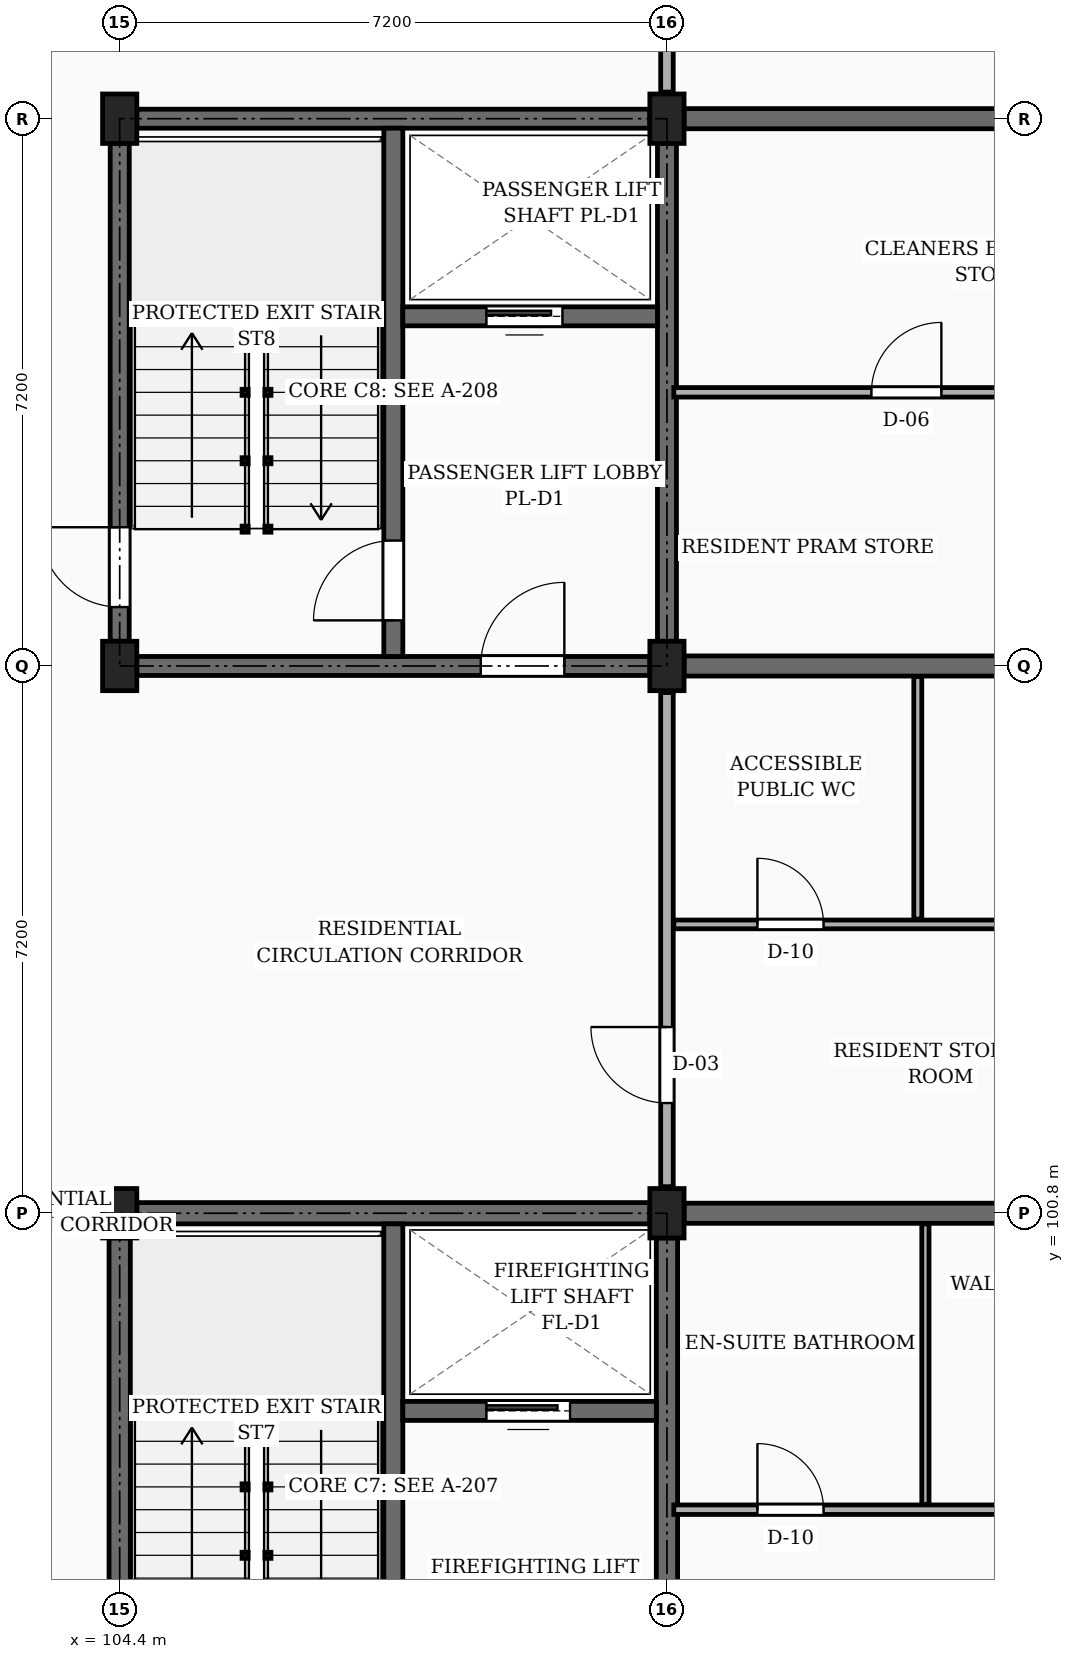
"""IFC4 building model, lengths in metres.
Left out: names, types, materials, properties, quantities, classifications, styles, units other than length and angle.
Written with IfcOpenShell. Run it as: python <this file> out.ifc"""

import sys

from ifc_helpers import new_model, si_unit, direction, frame, frame_2d, origin, origin_2d, place, context, subcontext, project, spatial, rectangle, extrude, element, fill, save


model = new_model("IFC4")
c1 = context("Model", 3, precision=1e-05, world=origin(), true_north=direction((0.0, 1.0)))
c2 = subcontext(c1, "Body", "Model", "MODEL_VIEW")
j1 = project(units=[si_unit("LENGTHUNIT", "METRE"), si_unit("PLANEANGLEUNIT", "RADIAN")], contexts=[c1])
p1 = place(None, origin())
s1 = spatial("IfcSite", under=j1, at=p1, CompositionType="ELEMENT")
p2 = place(p1, origin())
s2 = spatial("IfcBuilding", under=s1, at=p2, CompositionType="ELEMENT")
p3 = place(p2, frame((0.0, 0.0, 10.8)))
s3 = spatial("IfcBuildingStorey", under=s2, at=p3, CompositionType="ELEMENT", Elevation=10.8)
for number, where, z_axis, x_axis in (
    (1, (104.4, 100.8, 0.0), (0.0, 0.0, 1.0), (1.0, 0.0, 0.0)),
    (2, (104.4, 108.0, 0.0), (0.0, 0.0, 1.0), (1.0, 0.0, 0.0)),
    (3, (104.4, 115.2, 0.0), (0.0, 0.0, 1.0), (1.0, 0.0, 0.0)),
    (4, (111.6, 100.8, 0.0), (0.0, 0.0, 1.0), (1.0, 0.0, 0.0)),
    (5, (111.6, 108.0, 0.0), (0.0, 0.0, 1.0), (1.0, 0.0, 0.0)),
    (6, (111.6, 115.2, 0.0), (0.0, 0.0, 1.0), (1.0, 0.0, 0.0)),
):
    element("IfcColumn", number, at=place(p3, frame(where, z_axis=z_axis, x_axis=x_axis)), inside=s3, PredefinedType="COLUMN", context=c2, shape_type="SweptSolid", body=[
        extrude(rectangle(XDim=0.45, YDim=0.65, at=origin_2d()), origin(), (0.0, 0.0, 1.0), 3.15),
    ])
p4 = place(p3, frame((111.825, 100.8, 0.0), z_axis=(0.0, 0.0, 1.0), x_axis=(1.0, 0.0, 0.0)))
e7 = element("IfcWall", 7, at=p4, inside=s3, PredefinedType="SOLIDWALL", context=c2, shape_type="SweptSolid", body=[
    extrude(rectangle(XDim=6.7, YDim=0.265, at=frame_2d((3.35, 0.0))), origin(), (0.0, 0.0, 1.0), 2.19),
])
p5 = place(p3, frame((111.825, 108.0, 0.0), z_axis=(0.0, 0.0, 1.0), x_axis=(1.0, 0.0, 0.0)))
e8 = element("IfcWall", 8, at=p5, inside=s3, PredefinedType="SOLIDWALL", context=c2, shape_type="SweptSolid", body=[
    extrude(rectangle(XDim=6.7, YDim=0.265, at=frame_2d((3.35, 0.0))), origin(), (0.0, 0.0, 1.0), 2.19),
])
p6 = place(p5, frame((4.35, 0.0, 0.0)))
e9 = element("IfcOpeningElement", 9, at=p6, cuts=e8, PredefinedType="OPENING", context=c2, shape_type="SweptSolid", body=[
    extrude(rectangle(XDim=0.98, YDim=2.12, at=frame_2d((0.49, 1.06))), frame((0.0, 0.143, 0.0), z_axis=(0.0, -1.0, 0.0), x_axis=(1.0, 0.0, 0.0)), (0.0, 0.0, 1.0), 0.285),
])
p7 = place(p3, frame((111.825, 115.2, 0.0), z_axis=(0.0, 0.0, 1.0), x_axis=(1.0, 0.0, 0.0)))
e10 = element("IfcWall", 10, at=p7, inside=s3, PredefinedType="SOLIDWALL", context=c2, shape_type="SweptSolid", body=[
    extrude(rectangle(XDim=6.7, YDim=0.265, at=frame_2d((3.35, 0.0))), origin(), (0.0, 0.0, 1.0), 2.19),
])
p8 = place(p3, frame((104.4, 93.925, 0.0), z_axis=(0.0, 0.0, 1.0), x_axis=(0.0, 1.0, 0.0)))
e11 = element("IfcWall", 11, at=p8, inside=s3, PredefinedType="SHEAR", context=c2, shape_type="SweptSolid", body=[
    extrude(rectangle(XDim=6.55, YDim=0.28, at=frame_2d((3.275, 0.0))), origin(), (0.0, 0.0, 1.0), 2.89),
])
p9 = place(p8, frame((0.45, 0.0, 0.0)))
e12 = element("IfcOpeningElement", 12, at=p9, cuts=e11, PredefinedType="OPENING", context=c2, shape_type="SweptSolid", body=[
    extrude(rectangle(XDim=1.05, YDim=2.15, at=frame_2d((0.525, 1.075))), frame((0.0, 0.15, 0.0), z_axis=(0.0, -1.0, 0.0), x_axis=(1.0, 0.0, 0.0)), (0.0, 0.0, 1.0), 0.3),
])
p10 = place(p3, frame((104.625, 100.8, 0.0), z_axis=(0.0, 0.0, 1.0), x_axis=(1.0, 0.0, 0.0)))
e13 = element("IfcWall", 13, at=p10, inside=s3, PredefinedType="SHEAR", context=c2, shape_type="SweptSolid", body=[
    extrude(rectangle(XDim=6.75, YDim=0.28, at=frame_2d((3.375, 0.0))), origin(), (0.0, 0.0, 1.0), 2.89),
])
p11 = place(p3, frame((111.6, 93.925, 0.0), z_axis=(0.0, 0.0, 1.0), x_axis=(0.0, 1.0, 0.0)))
e14 = element("IfcWall", 14, at=p11, inside=s3, PredefinedType="SHEAR", context=c2, shape_type="SweptSolid", body=[
    extrude(rectangle(XDim=6.55, YDim=0.28, at=frame_2d((3.275, 0.0))), origin(), (0.0, 0.0, 1.0), 2.89),
])
p12 = place(p3, frame((108.0, 93.74, 0.0), z_axis=(0.0, 0.0, 1.0), x_axis=(0.0, 1.0, 0.0)))
e15 = element("IfcWall", 15, at=p12, inside=s3, PredefinedType="SHEAR", context=c2, shape_type="SweptSolid", body=[
    extrude(rectangle(XDim=6.92, YDim=0.25, at=frame_2d((3.46, 0.0))), origin(), (0.0, 0.0, 1.0), 2.89),
])
p13 = place(p12, frame((0.46, 0.0, 0.0)))
e16 = element("IfcOpeningElement", 16, at=p13, cuts=e15, PredefinedType="OPENING", context=c2, shape_type="SweptSolid", body=[
    extrude(rectangle(XDim=1.05, YDim=2.15, at=frame_2d((0.525, 1.075))), frame((0.0, 0.135, 0.0), z_axis=(0.0, -1.0, 0.0), x_axis=(1.0, 0.0, 0.0)), (0.0, 0.0, 1.0), 0.27),
])
p14 = place(p3, frame((108.125, 98.2, 0.0), z_axis=(0.0, 0.0, 1.0), x_axis=(1.0, 0.0, 0.0)))
e17 = element("IfcWall", 17, at=p14, inside=s3, PredefinedType="SHEAR", context=c2, shape_type="SweptSolid", body=[
    extrude(rectangle(XDim=3.335, YDim=0.25, at=frame_2d((1.667, 0.0))), origin(), (0.0, 0.0, 1.0), 2.89),
])
p15 = place(p14, frame((1.1, 0.0, 0.0)))
e18 = element("IfcOpeningElement", 18, at=p15, cuts=e17, PredefinedType="OPENING", context=c2, shape_type="SweptSolid", body=[
    extrude(rectangle(XDim=1.1, YDim=2.2, at=frame_2d((0.55, 1.1))), frame((0.0, 0.135, 0.0), z_axis=(0.0, -1.0, 0.0), x_axis=(1.0, 0.0, 0.0)), (0.0, 0.0, 1.0), 0.27),
])
p16 = place(p3, frame((104.4, 108.325, 0.0), z_axis=(0.0, 0.0, 1.0), x_axis=(0.0, 1.0, 0.0)))
e19 = element("IfcWall", 19, at=p16, inside=s3, PredefinedType="SHEAR", context=c2, shape_type="SweptSolid", body=[
    extrude(rectangle(XDim=6.55, YDim=0.25, at=frame_2d((3.275, 0.0))), origin(), (0.0, 0.0, 1.0), 2.89),
])
p17 = place(p16, frame((0.45, 0.0, 0.0)))
e20 = element("IfcOpeningElement", 20, at=p17, cuts=e19, PredefinedType="OPENING", context=c2, shape_type="SweptSolid", body=[
    extrude(rectangle(XDim=1.05, YDim=2.15, at=frame_2d((0.525, 1.075))), frame((0.0, 0.135, 0.0), z_axis=(0.0, -1.0, 0.0), x_axis=(1.0, 0.0, 0.0)), (0.0, 0.0, 1.0), 0.27),
])
p18 = place(p3, frame((104.625, 115.2, 0.0), z_axis=(0.0, 0.0, 1.0), x_axis=(1.0, 0.0, 0.0)))
e21 = element("IfcWall", 21, at=p18, inside=s3, PredefinedType="SHEAR", context=c2, shape_type="SweptSolid", body=[
    extrude(rectangle(XDim=6.75, YDim=0.25, at=frame_2d((3.375, 0.0))), origin(), (0.0, 0.0, 1.0), 2.89),
])
p19 = place(p3, frame((111.6, 108.325, 0.0), z_axis=(0.0, 0.0, 1.0), x_axis=(0.0, 1.0, 0.0)))
e22 = element("IfcWall", 22, at=p19, inside=s3, PredefinedType="SHEAR", context=c2, shape_type="SweptSolid", body=[
    extrude(rectangle(XDim=6.55, YDim=0.25, at=frame_2d((3.275, 0.0))), origin(), (0.0, 0.0, 1.0), 2.89),
])
p20 = place(p3, frame((104.625, 108.0, 0.0), z_axis=(0.0, 0.0, 1.0), x_axis=(1.0, 0.0, 0.0)))
e23 = element("IfcWall", 23, at=p20, inside=s3, PredefinedType="SHEAR", context=c2, shape_type="SweptSolid", body=[
    extrude(rectangle(XDim=6.75, YDim=0.25, at=frame_2d((3.375, 0.0))), origin(), (0.0, 0.0, 1.0), 2.89),
])
p21 = place(p20, frame((4.525, 0.0, 0.0)))
e24 = element("IfcOpeningElement", 24, at=p21, cuts=e23, PredefinedType="OPENING", context=c2, shape_type="SweptSolid", body=[
    extrude(rectangle(XDim=1.1, YDim=2.15, at=frame_2d((0.55, 1.075))), frame((0.0, 0.135, 0.0), z_axis=(0.0, -1.0, 0.0), x_axis=(1.0, 0.0, 0.0)), (0.0, 0.0, 1.0), 0.27),
])
p22 = place(p3, frame((108.0, 108.125, 0.0), z_axis=(0.0, 0.0, 1.0), x_axis=(0.0, 1.0, 0.0)))
e25 = element("IfcWall", 25, at=p22, inside=s3, PredefinedType="SHEAR", context=c2, shape_type="SweptSolid", body=[
    extrude(rectangle(XDim=6.95, YDim=0.25, at=frame_2d((3.475, 0.0))), origin(), (0.0, 0.0, 1.0), 2.89),
])
p23 = place(p22, frame((0.475, 0.0, 0.0)))
e26 = element("IfcOpeningElement", 26, at=p23, cuts=e25, PredefinedType="OPENING", context=c2, shape_type="SweptSolid", body=[
    extrude(rectangle(XDim=1.05, YDim=2.15, at=frame_2d((0.525, 1.075))), frame((0.0, 0.135, 0.0), z_axis=(0.0, -1.0, 0.0), x_axis=(1.0, 0.0, 0.0)), (0.0, 0.0, 1.0), 0.27),
])
p24 = place(p3, frame((108.125, 112.6, 0.0), z_axis=(0.0, 0.0, 1.0), x_axis=(1.0, 0.0, 0.0)))
e27 = element("IfcWall", 27, at=p24, inside=s3, PredefinedType="SHEAR", context=c2, shape_type="SweptSolid", body=[
    extrude(rectangle(XDim=3.35, YDim=0.25, at=frame_2d((1.675, 0.0))), origin(), (0.0, 0.0, 1.0), 2.89),
])
p25 = place(p24, frame((1.1, 0.0, 0.0)))
e28 = element("IfcOpeningElement", 28, at=p25, cuts=e27, PredefinedType="OPENING", context=c2, shape_type="SweptSolid", body=[
    extrude(rectangle(XDim=1.0, YDim=2.2, at=frame_2d((0.5, 1.1))), frame((0.0, 0.135, 0.0), z_axis=(0.0, -1.0, 0.0), x_axis=(1.0, 0.0, 0.0)), (0.0, 0.0, 1.0), 0.27),
])
p26 = place(p3, frame((111.6, 101.15, 0.0), z_axis=(0.0, 0.0, 1.0), x_axis=(0.0, 1.0, 0.0)))
e29 = element("IfcWall", 29, at=p26, inside=s3, PredefinedType="PARTITIONING", context=c2, shape_type="SweptSolid", body=[
    extrude(rectangle(XDim=6.5, YDim=0.165, at=frame_2d((3.25, 0.0))), origin(), (0.0, 0.0, 1.0), 2.24),
])
p27 = place(p26, frame((1.1, 0.0, 0.0)))
e30 = element("IfcOpeningElement", 30, at=p27, cuts=e29, PredefinedType="OPENING", context=c2, shape_type="SweptSolid", body=[
    extrude(rectangle(XDim=1.0, YDim=2.15, at=frame_2d((0.5, 1.075))), frame((0.0, 0.093, 0.0), z_axis=(0.0, -1.0, 0.0), x_axis=(1.0, 0.0, 0.0)), (0.0, 0.0, 1.0), 0.185),
])
p28 = place(p3, frame((111.6, 115.55, 0.0), z_axis=(0.0, 0.0, 1.0), x_axis=(0.0, 1.0, 0.0)))
e31 = element("IfcWall", 31, at=p28, inside=s3, PredefinedType="PARTITIONING", context=c2, shape_type="SweptSolid", body=[
    extrude(rectangle(XDim=6.5, YDim=0.165, at=frame_2d((3.25, 0.0))), origin(), (0.0, 0.0, 1.0), 2.24),
])
p29 = place(p28, frame((1.1, 0.0, 0.0)))
e32 = element("IfcOpeningElement", 32, at=p29, cuts=e31, PredefinedType="OPENING", context=c2, shape_type="SweptSolid", body=[
    extrude(rectangle(XDim=0.94, YDim=2.12, at=frame_2d((0.47, 1.06))), frame((0.0, 0.093, 0.0), z_axis=(0.0, -1.0, 0.0), x_axis=(1.0, 0.0, 0.0)), (0.0, 0.0, 1.0), 0.185),
])
p30 = place(p3, frame((111.69, 96.9, 0.0), z_axis=(0.0, 0.0, 1.0), x_axis=(1.0, 0.0, 0.0)))
e33 = element("IfcWall", 33, at=p30, inside=s3, PredefinedType="PARTITIONING", context=c2, shape_type="SweptSolid", body=[
    extrude(rectangle(XDim=6.935, YDim=0.125, at=frame_2d((3.468, 0.0))), origin(), (0.0, 0.0, 1.0), 2.325),
])
p31 = place(p30, frame((1.1, 0.0, 0.0)))
e34 = element("IfcOpeningElement", 34, at=p31, cuts=e33, PredefinedType="OPENING", context=c2, shape_type="SweptSolid", body=[
    extrude(rectangle(XDim=0.87, YDim=2.05, at=frame_2d((0.435, 1.025))), frame((0.0, 0.073, 0.0), z_axis=(0.0, -1.0, 0.0), x_axis=(1.0, 0.0, 0.0)), (0.0, 0.0, 1.0), 0.145),
])
p32 = place(p30, frame((4.5, 0.0, 0.0)))
e35 = element("IfcOpeningElement", 35, at=p32, cuts=e33, PredefinedType="OPENING", context=c2, shape_type="SweptSolid", body=[
    extrude(rectangle(XDim=0.88, YDim=2.08, at=frame_2d((0.44, 1.04))), frame((0.0, 0.073, 0.0), z_axis=(0.0, -1.0, 0.0), x_axis=(1.0, 0.0, 0.0)), (0.0, 0.0, 1.0), 0.145),
])
p33 = place(p3, frame((115.0, 96.97, 0.0), z_axis=(0.0, 0.0, 1.0), x_axis=(0.0, 1.0, 0.0)))
e36 = element("IfcWall", 36, at=p33, inside=s3, PredefinedType="PARTITIONING", context=c2, shape_type="SweptSolid", body=[
    extrude(rectangle(XDim=3.69, YDim=0.095, at=frame_2d((1.845, 0.0))), origin(), (0.0, 0.0, 1.0), 2.325),
])
p34 = place(p3, frame((111.69, 104.6, 0.0), z_axis=(0.0, 0.0, 1.0), x_axis=(1.0, 0.0, 0.0)))
e37 = element("IfcWall", 37, at=p34, inside=s3, PredefinedType="PARTITIONING", context=c2, shape_type="SweptSolid", body=[
    extrude(rectangle(XDim=6.935, YDim=0.115, at=frame_2d((3.468, 0.0))), origin(), (0.0, 0.0, 1.0), 2.325),
])
p35 = place(p34, frame((1.1, 0.0, 0.0)))
e38 = element("IfcOpeningElement", 38, at=p35, cuts=e37, PredefinedType="OPENING", context=c2, shape_type="SweptSolid", body=[
    extrude(rectangle(XDim=0.87, YDim=2.05, at=frame_2d((0.435, 1.025))), frame((0.0, 0.067, 0.0), z_axis=(0.0, -1.0, 0.0), x_axis=(1.0, 0.0, 0.0)), (0.0, 0.0, 1.0), 0.135),
])
p36 = place(p34, frame((4.5, 0.0, 0.0)))
e39 = element("IfcOpeningElement", 39, at=p36, cuts=e37, PredefinedType="OPENING", context=c2, shape_type="SweptSolid", body=[
    extrude(rectangle(XDim=0.92, YDim=2.1, at=frame_2d((0.46, 1.05))), frame((0.0, 0.067, 0.0), z_axis=(0.0, -1.0, 0.0), x_axis=(1.0, 0.0, 0.0)), (0.0, 0.0, 1.0), 0.135),
])
p37 = place(p3, frame((114.9, 104.67, 0.0), z_axis=(0.0, 0.0, 1.0), x_axis=(0.0, 1.0, 0.0)))
e40 = element("IfcWall", 40, at=p37, inside=s3, PredefinedType="PARTITIONING", context=c2, shape_type="SweptSolid", body=[
    extrude(rectangle(XDim=3.19, YDim=0.105, at=frame_2d((1.595, 0.0))), origin(), (0.0, 0.0, 1.0), 2.325),
])
p38 = place(p3, frame((111.69, 111.6, 0.0), z_axis=(0.0, 0.0, 1.0), x_axis=(1.0, 0.0, 0.0)))
e41 = element("IfcWall", 41, at=p38, inside=s3, PredefinedType="PARTITIONING", context=c2, shape_type="SweptSolid", body=[
    extrude(rectangle(XDim=6.935, YDim=0.125, at=frame_2d((3.468, 0.0))), origin(), (0.0, 0.0, 1.0), 2.325),
])
p39 = place(p38, frame((2.6, 0.0, 0.0)))
e42 = element("IfcOpeningElement", 42, at=p39, cuts=e41, PredefinedType="OPENING", context=c2, shape_type="SweptSolid", body=[
    extrude(rectangle(XDim=0.92, YDim=2.1, at=frame_2d((0.46, 1.05))), frame((0.0, 0.073, 0.0), z_axis=(0.0, -1.0, 0.0), x_axis=(1.0, 0.0, 0.0)), (0.0, 0.0, 1.0), 0.145),
])
p40 = place(p15, origin())
e43 = element("IfcDoor", 43, at=p40, inside=s3, OperationType="SLIDING_TO_LEFT", PredefinedType="DOOR", context=c2, shape_type="SweptSolid", body=[
    extrude(rectangle(XDim=1.1, YDim=2.2, at=frame_2d((0.55, 1.1))), frame((0.0, 0.025, 0.0), z_axis=(0.0, -1.0, 0.0), x_axis=(1.0, 0.0, 0.0)), (0.0, 0.0, 1.0), 0.05),
])
fill(e18, e43)
p41 = place(p17, origin())
e44 = element("IfcDoor", 44, at=p41, inside=s3, OperationType="SINGLE_SWING_RIGHT", PredefinedType="DOOR", context=c2, shape_type="SweptSolid", body=[
    extrude(rectangle(XDim=1.05, YDim=2.15, at=frame_2d((0.525, 1.075))), frame((0.0, 0.025, 0.0), z_axis=(0.0, -1.0, 0.0), x_axis=(1.0, 0.0, 0.0)), (0.0, 0.0, 1.0), 0.05),
])
fill(e20, e44)
p42 = place(p21, frame((1.1, 0.0, 0.0), z_axis=(0.0, 0.0, 1.0), x_axis=(-1.0, 0.0, 0.0)))
e45 = element("IfcDoor", 45, at=p42, inside=s3, OperationType="SINGLE_SWING_RIGHT", PredefinedType="DOOR", context=c2, shape_type="SweptSolid", body=[
    extrude(rectangle(XDim=1.1, YDim=2.15, at=frame_2d((0.55, 1.075))), frame((0.0, 0.025, 0.0), z_axis=(0.0, -1.0, 0.0), x_axis=(1.0, 0.0, 0.0)), (0.0, 0.0, 1.0), 0.05),
])
fill(e24, e45)
p43 = place(p23, origin())
e46 = element("IfcDoor", 46, at=p43, inside=s3, OperationType="SINGLE_SWING_LEFT", PredefinedType="DOOR", context=c2, shape_type="SweptSolid", body=[
    extrude(rectangle(XDim=1.05, YDim=2.15, at=frame_2d((0.525, 1.075))), frame((0.0, 0.025, 0.0), z_axis=(0.0, -1.0, 0.0), x_axis=(1.0, 0.0, 0.0)), (0.0, 0.0, 1.0), 0.05),
])
fill(e26, e46)
p44 = place(p25, origin())
e47 = element("IfcDoor", 47, at=p44, inside=s3, OperationType="SLIDING_TO_LEFT", PredefinedType="DOOR", context=c2, shape_type="SweptSolid", body=[
    extrude(rectangle(XDim=1.0, YDim=2.2, at=frame_2d((0.5, 1.1))), frame((0.0, 0.025, 0.0), z_axis=(0.0, -1.0, 0.0), x_axis=(1.0, 0.0, 0.0)), (0.0, 0.0, 1.0), 0.05),
])
fill(e28, e47)
p45 = place(p27, origin())
e48 = element("IfcDoor", 48, at=p45, inside=s3, OperationType="SINGLE_SWING_RIGHT", PredefinedType="DOOR", context=c2, shape_type="SweptSolid", body=[
    extrude(rectangle(XDim=1.0, YDim=2.15, at=frame_2d((0.5, 1.075))), frame((0.0, 0.025, 0.0), z_axis=(0.0, -1.0, 0.0), x_axis=(1.0, 0.0, 0.0)), (0.0, 0.0, 1.0), 0.05),
])
fill(e30, e48)
p46 = place(p31, origin())
e49 = element("IfcDoor", 49, at=p46, inside=s3, OperationType="SINGLE_SWING_LEFT", PredefinedType="DOOR", context=c2, shape_type="SweptSolid", body=[
    extrude(rectangle(XDim=0.87, YDim=2.05, at=frame_2d((0.435, 1.025))), frame((0.0, 0.025, 0.0), z_axis=(0.0, -1.0, 0.0), x_axis=(1.0, 0.0, 0.0)), (0.0, 0.0, 1.0), 0.05),
])
fill(e34, e49)
p47 = place(p35, origin())
e50 = element("IfcDoor", 50, at=p47, inside=s3, OperationType="SINGLE_SWING_LEFT", PredefinedType="DOOR", context=c2, shape_type="SweptSolid", body=[
    extrude(rectangle(XDim=0.87, YDim=2.05, at=frame_2d((0.435, 1.025))), frame((0.0, 0.025, 0.0), z_axis=(0.0, -1.0, 0.0), x_axis=(1.0, 0.0, 0.0)), (0.0, 0.0, 1.0), 0.05),
])
fill(e38, e50)
p48 = place(p39, origin())
e51 = element("IfcDoor", 51, at=p48, inside=s3, OperationType="SINGLE_SWING_RIGHT", PredefinedType="DOOR", context=c2, shape_type="SweptSolid", body=[
    extrude(rectangle(XDim=0.92, YDim=2.1, at=frame_2d((0.46, 1.05))), frame((0.0, 0.025, 0.0), z_axis=(0.0, -1.0, 0.0), x_axis=(1.0, 0.0, 0.0)), (0.0, 0.0, 1.0), 0.05),
])
fill(e42, e51)
save(model, sys.argv[1])
